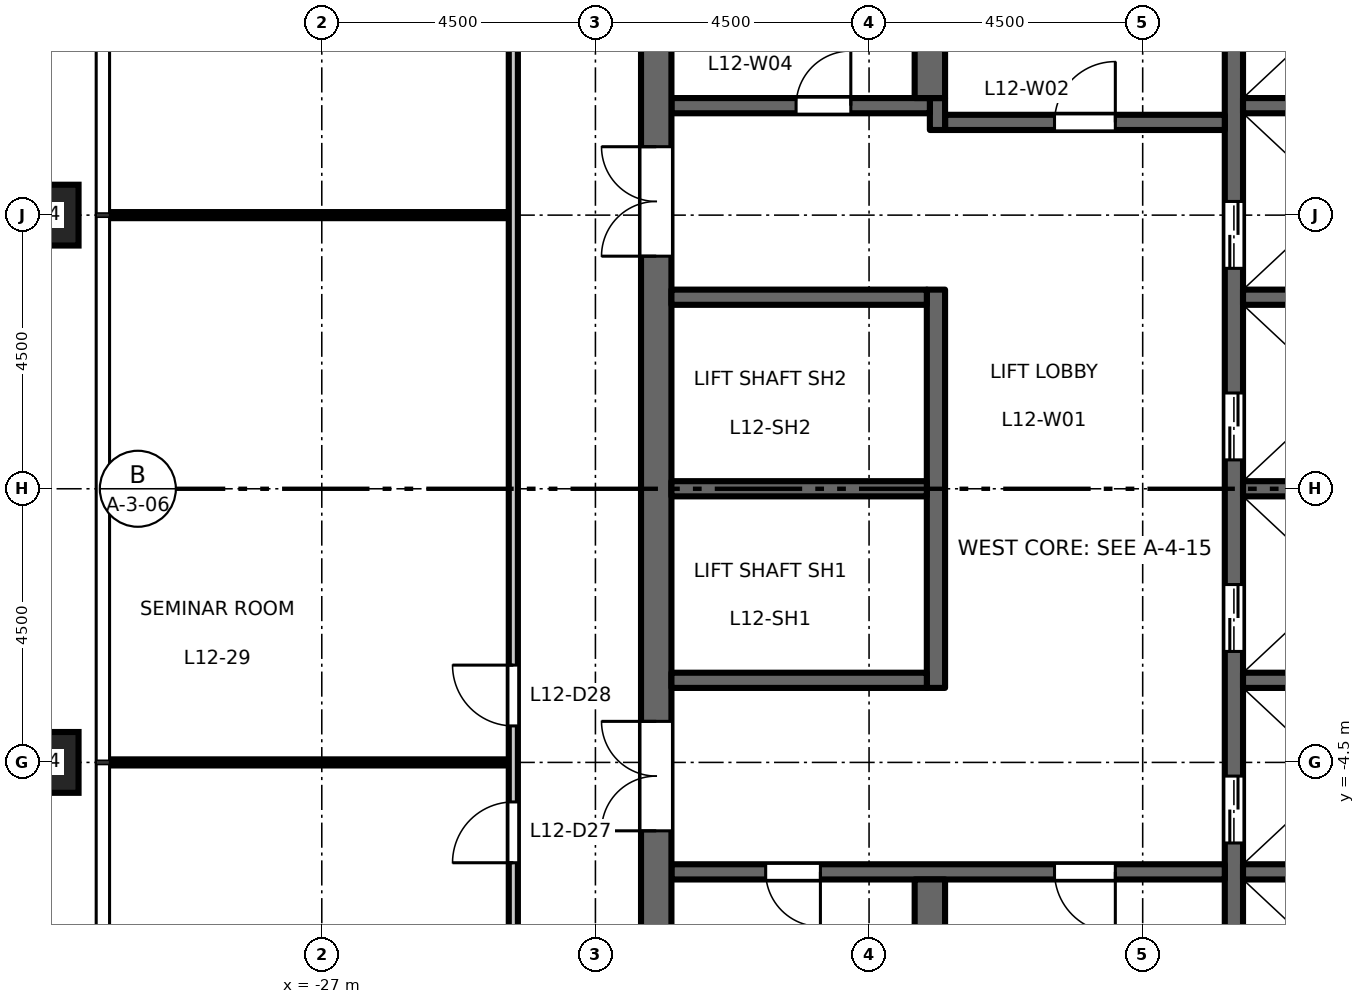
"""IFC4 building model, lengths in metres.
Left out: names, types, materials, properties, quantities, classifications, styles, units other than length and angle.
Written with IfcOpenShell. Run it as: python <this file> out.ifc"""

import sys

from ifc_helpers import new_model, si_unit, direction, frame, frame_2d, origin, origin_2d, place, context, subcontext, project, spatial, rectangle, hollow_rectangle, extrude, element, fill, save


model = new_model("IFC4")
c1 = context("Model", 3, precision=1e-05, world=origin(), true_north=direction((0.0, 1.0)))
c2 = subcontext(c1, "Body", "Model", "MODEL_VIEW")
j1 = project(units=[si_unit("LENGTHUNIT", "METRE"), si_unit("PLANEANGLEUNIT", "RADIAN")], contexts=[c1])
p1 = place(None, origin())
s1 = spatial("IfcSite", under=j1, at=p1, CompositionType="ELEMENT")
p2 = place(p1, origin())
s2 = spatial("IfcBuilding", under=s1, at=p2, CompositionType="ELEMENT")
p3 = place(p2, frame((0.0, 0.0, 58.2)))
s3 = spatial("IfcBuildingStorey", under=s2, at=p3, CompositionType="ELEMENT", Elevation=58.2)
for number, where, z_axis, x_axis in (
    (1, (-31.5, 4.5, 0.0), (0.0, 0.0, 1.0), (1.0, 0.0, 0.0)),
    (2, (-31.5, -4.5, 0.0), (0.0, 0.0, 1.0), (1.0, 0.0, 0.0)),
):
    element("IfcColumn", number, at=place(p3, frame(where, z_axis=z_axis, x_axis=x_axis)), inside=s3, PredefinedType="COLUMN", context=c2, shape_type="SweptSolid", body=[
        extrude(hollow_rectangle(XDim=1.0, YDim=1.0, WallThickness=0.06, at=origin_2d()), origin(), (0.0, 0.0, 1.0), 4.5),
    ])
p4 = place(p3, frame((-12.0, -9.45, 0.0), z_axis=(0.0, 0.0, 1.0), x_axis=(0.0, 1.0, 0.0)))
e3 = element("IfcWall", 3, at=p4, inside=s3, PredefinedType="SHEAR", context=c2, shape_type="SweptSolid", body=[
    extrude(rectangle(XDim=18.9, YDim=0.3, at=frame_2d((9.45, 0.0))), origin(), (0.0, 0.0, 1.0), 4.35),
])
p5 = place(p4, frame((3.625, 0.0, 0.0)))
e4 = element("IfcOpeningElement", 4, at=p5, cuts=e3, PredefinedType="OPENING", context=c2, shape_type="SweptSolid", body=[
    extrude(rectangle(XDim=1.1, YDim=2.1, at=frame_2d((0.55, 1.05))), frame((0.0, 0.16, 0.0), z_axis=(0.0, -1.0, 0.0), x_axis=(1.0, 0.0, 0.0)), (0.0, 0.0, 1.0), 0.32),
])
p6 = place(p4, frame((6.775, 0.0, 0.0)))
e5 = element("IfcOpeningElement", 5, at=p6, cuts=e3, PredefinedType="OPENING", context=c2, shape_type="SweptSolid", body=[
    extrude(rectangle(XDim=1.1, YDim=2.1, at=frame_2d((0.55, 1.05))), frame((0.0, 0.16, 0.0), z_axis=(0.0, -1.0, 0.0), x_axis=(1.0, 0.0, 0.0)), (0.0, 0.0, 1.0), 0.32),
])
p7 = place(p4, frame((9.925, 0.0, 0.0)))
e6 = element("IfcOpeningElement", 6, at=p7, cuts=e3, PredefinedType="OPENING", context=c2, shape_type="SweptSolid", body=[
    extrude(rectangle(XDim=1.1, YDim=2.1, at=frame_2d((0.55, 1.05))), frame((0.0, 0.16, 0.0), z_axis=(0.0, -1.0, 0.0), x_axis=(1.0, 0.0, 0.0)), (0.0, 0.0, 1.0), 0.32),
])
p8 = place(p4, frame((13.075, 0.0, 0.0)))
e7 = element("IfcOpeningElement", 7, at=p8, cuts=e3, PredefinedType="OPENING", context=c2, shape_type="SweptSolid", body=[
    extrude(rectangle(XDim=1.1, YDim=2.1, at=frame_2d((0.55, 1.05))), frame((0.0, 0.16, 0.0), z_axis=(0.0, -1.0, 0.0), x_axis=(1.0, 0.0, 0.0)), (0.0, 0.0, 1.0), 0.32),
])
p9 = place(p4, frame((16.725, 0.0, 0.0)))
e8 = element("IfcOpeningElement", 8, at=p9, cuts=e3, PredefinedType="OPENING", context=c2, shape_type="SweptSolid", body=[
    extrude(rectangle(XDim=1.2, YDim=2.1, at=frame_2d((0.6, 1.05))), frame((0.0, 0.16, 0.0), z_axis=(0.0, -1.0, 0.0), x_axis=(1.0, 0.0, 0.0)), (0.0, 0.0, 1.0), 0.32),
])
p10 = place(p4, frame((0.975, 0.0, 0.0)))
e9 = element("IfcOpeningElement", 9, at=p10, cuts=e3, PredefinedType="OPENING", context=c2, shape_type="SweptSolid", body=[
    extrude(rectangle(XDim=1.2, YDim=2.1, at=frame_2d((0.6, 1.05))), frame((0.0, 0.16, 0.0), z_axis=(0.0, -1.0, 0.0), x_axis=(1.0, 0.0, 0.0)), (0.0, 0.0, 1.0), 0.32),
])
p11 = place(p3, frame((-12.15, 6.025, 0.0), z_axis=(0.0, 0.0, 1.0), x_axis=(-1.0, 0.0, 0.0)))
e10 = element("IfcWall", 10, at=p11, inside=s3, PredefinedType="SHEAR", context=c2, shape_type="SweptSolid", body=[
    extrude(rectangle(XDim=4.6, YDim=0.25, at=frame_2d((2.3, 0.0))), origin(), (0.0, 0.0, 1.0), 4.35),
])
p12 = place(p11, frame((1.8, 0.0, 0.0)))
e11 = element("IfcOpeningElement", 11, at=p12, cuts=e10, PredefinedType="OPENING", context=c2, shape_type="SweptSolid", body=[
    extrude(rectangle(XDim=1.0, YDim=2.1, at=frame_2d((0.5, 1.05))), frame((0.0, 0.135, 0.0), z_axis=(0.0, -1.0, 0.0), x_axis=(1.0, 0.0, 0.0)), (0.0, 0.0, 1.0), 0.27),
])
p13 = place(p3, frame((-16.875, 5.9, 0.0), z_axis=(0.0, 0.0, 1.0), x_axis=(0.0, 1.0, 0.0)))
e12 = element("IfcWall", 12, at=p13, inside=s3, PredefinedType="SHEAR", context=c2, shape_type="SweptSolid", body=[
    extrude(rectangle(XDim=0.525, YDim=0.25, at=frame_2d((0.263, 0.0))), origin(), (0.0, 0.0, 1.0), 4.35),
])
p14 = place(p3, frame((-17.0, 6.3, 0.0), z_axis=(0.0, 0.0, 1.0), x_axis=(-1.0, 0.0, 0.0)))
e13 = element("IfcWall", 13, at=p14, inside=s3, PredefinedType="SHEAR", context=c2, shape_type="SweptSolid", body=[
    extrude(rectangle(XDim=4.25, YDim=0.25, at=frame_2d((2.125, 0.0))), origin(), (0.0, 0.0, 1.0), 4.35),
])
p15 = place(p14, frame((1.3, 0.0, 0.0)))
e14 = element("IfcOpeningElement", 14, at=p15, cuts=e13, PredefinedType="OPENING", context=c2, shape_type="SweptSolid", body=[
    extrude(rectangle(XDim=0.9, YDim=2.1, at=frame_2d((0.45, 1.05))), frame((0.0, 0.135, 0.0), z_axis=(0.0, -1.0, 0.0), x_axis=(1.0, 0.0, 0.0)), (0.0, 0.0, 1.0), 0.27),
])
p16 = place(p3, frame((-12.15, -6.3, 0.0), z_axis=(0.0, 0.0, 1.0), x_axis=(-1.0, 0.0, 0.0)))
e15 = element("IfcWall", 15, at=p16, inside=s3, PredefinedType="SHEAR", context=c2, shape_type="SweptSolid", body=[
    extrude(rectangle(XDim=9.1, YDim=0.25, at=frame_2d((4.55, 0.0))), origin(), (0.0, 0.0, 1.0), 4.35),
])
p17 = place(p16, frame((1.8, 0.0, 0.0)))
e16 = element("IfcOpeningElement", 16, at=p17, cuts=e15, PredefinedType="OPENING", context=c2, shape_type="SweptSolid", body=[
    extrude(rectangle(XDim=1.0, YDim=2.1, at=frame_2d((0.5, 1.05))), frame((0.0, 0.135, 0.0), z_axis=(0.0, -1.0, 0.0), x_axis=(1.0, 0.0, 0.0)), (0.0, 0.0, 1.0), 0.27),
])
p18 = place(p16, frame((6.65, 0.0, 0.0)))
e17 = element("IfcOpeningElement", 17, at=p18, cuts=e15, PredefinedType="OPENING", context=c2, shape_type="SweptSolid", body=[
    extrude(rectangle(XDim=0.9, YDim=2.1, at=frame_2d((0.45, 1.05))), frame((0.0, 0.135, 0.0), z_axis=(0.0, -1.0, 0.0), x_axis=(1.0, 0.0, 0.0)), (0.0, 0.0, 1.0), 0.27),
])
p19 = place(p3, frame((-21.5, -13.0, 0.0), z_axis=(0.0, 0.0, 1.0), x_axis=(0.0, 1.0, 0.0)))
e18 = element("IfcWall", 18, at=p19, inside=s3, PredefinedType="SHEAR", context=c2, shape_type="SweptSolid", body=[
    extrude(rectangle(XDim=26.0, YDim=0.5, at=frame_2d((13.0, 0.0))), origin(), (0.0, 0.0, 1.0), 4.35),
])
p20 = place(p19, frame((16.825, 0.0, 0.0)))
e19 = element("IfcOpeningElement", 19, at=p20, cuts=e18, PredefinedType="OPENING", context=c2, shape_type="SweptSolid", body=[
    extrude(rectangle(XDim=1.8, YDim=2.1, at=frame_2d((0.9, 1.05))), frame((0.0, 0.26, 0.0), z_axis=(0.0, -1.0, 0.0), x_axis=(1.0, 0.0, 0.0)), (0.0, 0.0, 1.0), 0.52),
])
p21 = place(p19, frame((7.375, 0.0, 0.0)))
e20 = element("IfcOpeningElement", 20, at=p21, cuts=e18, PredefinedType="OPENING", context=c2, shape_type="SweptSolid", body=[
    extrude(rectangle(XDim=1.8, YDim=2.1, at=frame_2d((0.9, 1.05))), frame((0.0, 0.26, 0.0), z_axis=(0.0, -1.0, 0.0), x_axis=(1.0, 0.0, 0.0)), (0.0, 0.0, 1.0), 0.52),
])
p22 = place(p19, frame((23.4, 0.0, 0.0)))
e21 = element("IfcOpeningElement", 21, at=p22, cuts=e18, PredefinedType="OPENING", context=c2, shape_type="SweptSolid", body=[
    extrude(rectangle(XDim=0.9, YDim=2.1, at=frame_2d((0.45, 1.05))), frame((0.0, 0.26, 0.0), z_axis=(0.0, -1.0, 0.0), x_axis=(1.0, 0.0, 0.0)), (0.0, 0.0, 1.0), 0.52),
])
p23 = place(p3, frame((-16.9, -3.275, 0.0), z_axis=(0.0, 0.0, 1.0), x_axis=(0.0, 1.0, 0.0)))
e22 = element("IfcWall", 22, at=p23, inside=s3, PredefinedType="SHEAR", context=c2, shape_type="SweptSolid", body=[
    extrude(rectangle(XDim=6.55, YDim=0.3, at=frame_2d((3.275, 0.0))), origin(), (0.0, 0.0, 1.0), 4.35),
])
for number, where, z_axis, x_axis in (
    (23, (-17.05, 0.0, 0.0), (0.0, 0.0, 1.0), (-1.0, 0.0, 0.0)),
    (24, (-17.05, 3.15, 0.0), (0.0, 0.0, 1.0), (-1.0, 0.0, 0.0)),
    (25, (-17.05, -3.15, 0.0), (0.0, 0.0, 1.0), (-1.0, 0.0, 0.0)),
):
    element("IfcWall", number, at=place(p3, frame(where, z_axis=z_axis, x_axis=x_axis)), inside=s3, PredefinedType="SHEAR", context=c2, shape_type="SweptSolid", body=[
        extrude(rectangle(XDim=4.2, YDim=0.25, at=frame_2d((2.1, 0.0))), origin(), (0.0, 0.0, 1.0), 4.35),
    ])
for number, where, z_axis, x_axis in (
    (26, (-17.0, 6.425, 0.0), (0.0, 0.0, 1.0), (0.0, 1.0, 0.0)),
    (27, (-17.0, -13.0, 0.0), (0.0, 0.0, 1.0), (0.0, 1.0, 0.0)),
):
    element("IfcWall", number, at=place(p3, frame(where, z_axis=z_axis, x_axis=x_axis)), inside=s3, PredefinedType="SHEAR", context=c2, shape_type="SweptSolid", body=[
        extrude(rectangle(XDim=6.575, YDim=0.5, at=frame_2d((3.288, 0.0))), origin(), (0.0, 0.0, 1.0), 4.35),
    ])
for number, where, z_axis, x_axis in (
    (28, (-8.75, 0.0, 0.0), (0.0, 0.0, 1.0), (-1.0, 0.0, 0.0)),
    (29, (-8.75, 3.15, 0.0), (0.0, 0.0, 1.0), (-1.0, 0.0, 0.0)),
    (30, (-8.75, 6.3, 0.0), (0.0, 0.0, 1.0), (-1.0, 0.0, 0.0)),
    (31, (-8.75, -3.15, 0.0), (0.0, 0.0, 1.0), (-1.0, 0.0, 0.0)),
    (32, (-8.75, -6.3, 0.0), (0.0, 0.0, 1.0), (-1.0, 0.0, 0.0)),
):
    element("IfcWall", number, at=place(p3, frame(where, z_axis=z_axis, x_axis=x_axis)), inside=s3, PredefinedType="SHEAR", context=c2, shape_type="SweptSolid", body=[
        extrude(rectangle(XDim=3.1, YDim=0.25, at=frame_2d((1.55, 0.0))), origin(), (0.0, 0.0, 1.0), 4.35),
    ])
for number, where, z_axis, x_axis in (
    (33, (-30.51, -4.5, 0.0), (0.0, 0.0, 1.0), (1.0, 0.0, 0.0)),
    (34, (-30.51, 4.5, 0.0), (0.0, 0.0, 1.0), (1.0, 0.0, 0.0)),
):
    element("IfcWall", number, at=place(p3, frame(where, z_axis=z_axis, x_axis=x_axis)), inside=s3, PredefinedType="PARTITIONING", context=c2, shape_type="SweptSolid", body=[
        extrude(rectangle(XDim=6.585, YDim=0.1, at=frame_2d((3.292, 0.0))), origin(), (0.0, 0.0, 1.0), 4.35),
    ])
p24 = place(p3, frame((-23.85, -15.525, 0.0), z_axis=(0.0, 0.0, 1.0), x_axis=(0.0, 1.0, 0.0)))
e35 = element("IfcWall", 35, at=p24, inside=s3, PredefinedType="PARTITIONING", context=c2, shape_type="SweptSolid", body=[
    extrude(rectangle(XDim=31.05, YDim=0.15, at=frame_2d((15.525, 0.0))), origin(), (0.0, 0.0, 1.0), 4.35),
])
p25 = place(p24, frame((29.475, 0.0, 0.0)))
e36 = element("IfcOpeningElement", 36, at=p25, cuts=e35, PredefinedType="OPENING", context=c2, shape_type="SweptSolid", body=[
    extrude(rectangle(XDim=1.0, YDim=2.1, at=frame_2d((0.5, 1.05))), frame((0.0, 0.085, 0.0), z_axis=(0.0, -1.0, 0.0), x_axis=(1.0, 0.0, 0.0)), (0.0, 0.0, 1.0), 0.17),
])
p26 = place(p24, frame((0.375, 0.0, 0.0)))
e37 = element("IfcOpeningElement", 37, at=p26, cuts=e35, PredefinedType="OPENING", context=c2, shape_type="SweptSolid", body=[
    extrude(rectangle(XDim=1.0, YDim=2.1, at=frame_2d((0.5, 1.05))), frame((0.0, 0.085, 0.0), z_axis=(0.0, -1.0, 0.0), x_axis=(1.0, 0.0, 0.0)), (0.0, 0.0, 1.0), 0.17),
])
p27 = place(p24, frame((9.375, 0.0, 0.0)))
e38 = element("IfcOpeningElement", 38, at=p27, cuts=e35, PredefinedType="OPENING", context=c2, shape_type="SweptSolid", body=[
    extrude(rectangle(XDim=1.0, YDim=2.1, at=frame_2d((0.5, 1.05))), frame((0.0, 0.085, 0.0), z_axis=(0.0, -1.0, 0.0), x_axis=(1.0, 0.0, 0.0)), (0.0, 0.0, 1.0), 0.17),
])
p28 = place(p24, frame((11.625, 0.0, 0.0)))
e39 = element("IfcOpeningElement", 39, at=p28, cuts=e35, PredefinedType="OPENING", context=c2, shape_type="SweptSolid", body=[
    extrude(rectangle(XDim=1.0, YDim=2.1, at=frame_2d((0.5, 1.05))), frame((0.0, 0.085, 0.0), z_axis=(0.0, -1.0, 0.0), x_axis=(1.0, 0.0, 0.0)), (0.0, 0.0, 1.0), 0.17),
])
p29 = place(p24, frame((27.375, 0.0, 0.0)))
e40 = element("IfcOpeningElement", 40, at=p29, cuts=e35, PredefinedType="OPENING", context=c2, shape_type="SweptSolid", body=[
    extrude(rectangle(XDim=1.0, YDim=2.1, at=frame_2d((0.5, 1.05))), frame((0.0, 0.085, 0.0), z_axis=(0.0, -1.0, 0.0), x_axis=(1.0, 0.0, 0.0)), (0.0, 0.0, 1.0), 0.17),
])
p30 = place(p12, origin())
e41 = element("IfcDoor", 41, at=p30, inside=s3, OperationType="SINGLE_SWING_LEFT", PredefinedType="DOOR", context=c2, shape_type="SweptSolid", body=[
    extrude(rectangle(XDim=1.0, YDim=2.1, at=frame_2d((0.5, 1.05))), frame((0.0, 0.025, 0.0), z_axis=(0.0, -1.0, 0.0), x_axis=(1.0, 0.0, 0.0)), (0.0, 0.0, 1.0), 0.05),
])
fill(e11, e41)
p31 = place(p17, origin())
e42 = element("IfcDoor", 42, at=p31, inside=s3, OperationType="SINGLE_SWING_RIGHT", PredefinedType="DOOR", context=c2, shape_type="SweptSolid", body=[
    extrude(rectangle(XDim=1.0, YDim=2.1, at=frame_2d((0.5, 1.05))), frame((0.0, 0.025, 0.0), z_axis=(0.0, -1.0, 0.0), x_axis=(1.0, 0.0, 0.0)), (0.0, 0.0, 1.0), 0.05),
])
fill(e16, e42)
p32 = place(p20, origin())
e43 = element("IfcDoor", 43, at=p32, inside=s3, OperationType="DOUBLE_DOOR_DOUBLE_SWING", PredefinedType="DOOR", context=c2, shape_type="SweptSolid", body=[
    extrude(rectangle(XDim=1.8, YDim=2.1, at=frame_2d((0.9, 1.05))), frame((0.0, 0.025, 0.0), z_axis=(0.0, -1.0, 0.0), x_axis=(1.0, 0.0, 0.0)), (0.0, 0.0, 1.0), 0.05),
])
fill(e19, e43)
p33 = place(p21, origin())
e44 = element("IfcDoor", 44, at=p33, inside=s3, OperationType="DOUBLE_DOOR_DOUBLE_SWING", PredefinedType="DOOR", context=c2, shape_type="SweptSolid", body=[
    extrude(rectangle(XDim=1.8, YDim=2.1, at=frame_2d((0.9, 1.05))), frame((0.0, 0.025, 0.0), z_axis=(0.0, -1.0, 0.0), x_axis=(1.0, 0.0, 0.0)), (0.0, 0.0, 1.0), 0.05),
])
fill(e20, e44)
p34 = place(p5, origin())
e45 = element("IfcDoor", 45, at=p34, inside=s3, OperationType="DOUBLE_DOOR_SLIDING", PredefinedType="DOOR", context=c2, shape_type="SweptSolid", body=[
    extrude(rectangle(XDim=1.1, YDim=2.1, at=frame_2d((0.55, 1.05))), frame((0.0, 0.025, 0.0), z_axis=(0.0, -1.0, 0.0), x_axis=(1.0, 0.0, 0.0)), (0.0, 0.0, 1.0), 0.05),
])
fill(e4, e45)
p35 = place(p6, origin())
e46 = element("IfcDoor", 46, at=p35, inside=s3, OperationType="DOUBLE_DOOR_SLIDING", PredefinedType="DOOR", context=c2, shape_type="SweptSolid", body=[
    extrude(rectangle(XDim=1.1, YDim=2.1, at=frame_2d((0.55, 1.05))), frame((0.0, 0.025, 0.0), z_axis=(0.0, -1.0, 0.0), x_axis=(1.0, 0.0, 0.0)), (0.0, 0.0, 1.0), 0.05),
])
fill(e5, e46)
p36 = place(p7, origin())
e47 = element("IfcDoor", 47, at=p36, inside=s3, OperationType="DOUBLE_DOOR_SLIDING", PredefinedType="DOOR", context=c2, shape_type="SweptSolid", body=[
    extrude(rectangle(XDim=1.1, YDim=2.1, at=frame_2d((0.55, 1.05))), frame((0.0, 0.025, 0.0), z_axis=(0.0, -1.0, 0.0), x_axis=(1.0, 0.0, 0.0)), (0.0, 0.0, 1.0), 0.05),
])
fill(e6, e47)
p37 = place(p8, origin())
e48 = element("IfcDoor", 48, at=p37, inside=s3, OperationType="DOUBLE_DOOR_SLIDING", PredefinedType="DOOR", context=c2, shape_type="SweptSolid", body=[
    extrude(rectangle(XDim=1.1, YDim=2.1, at=frame_2d((0.55, 1.05))), frame((0.0, 0.025, 0.0), z_axis=(0.0, -1.0, 0.0), x_axis=(1.0, 0.0, 0.0)), (0.0, 0.0, 1.0), 0.05),
])
fill(e7, e48)
p38 = place(p15, origin())
e49 = element("IfcDoor", 49, at=p38, inside=s3, OperationType="SINGLE_SWING_LEFT", PredefinedType="DOOR", context=c2, shape_type="SweptSolid", body=[
    extrude(rectangle(XDim=0.9, YDim=2.1, at=frame_2d((0.45, 1.05))), frame((0.0, 0.025, 0.0), z_axis=(0.0, -1.0, 0.0), x_axis=(1.0, 0.0, 0.0)), (0.0, 0.0, 1.0), 0.05),
])
fill(e14, e49)
p39 = place(p18, origin())
e50 = element("IfcDoor", 50, at=p39, inside=s3, OperationType="SINGLE_SWING_RIGHT", PredefinedType="DOOR", context=c2, shape_type="SweptSolid", body=[
    extrude(rectangle(XDim=0.9, YDim=2.1, at=frame_2d((0.45, 1.05))), frame((0.0, 0.025, 0.0), z_axis=(0.0, -1.0, 0.0), x_axis=(1.0, 0.0, 0.0)), (0.0, 0.0, 1.0), 0.05),
])
fill(e17, e50)
p40 = place(p27, origin())
e51 = element("IfcDoor", 51, at=p40, inside=s3, OperationType="SINGLE_SWING_LEFT", PredefinedType="DOOR", context=c2, shape_type="SweptSolid", body=[
    extrude(rectangle(XDim=1.0, YDim=2.1, at=frame_2d((0.5, 1.05))), frame((0.0, 0.025, 0.0), z_axis=(0.0, -1.0, 0.0), x_axis=(1.0, 0.0, 0.0)), (0.0, 0.0, 1.0), 0.05),
])
fill(e38, e51)
p41 = place(p28, origin())
e52 = element("IfcDoor", 52, at=p41, inside=s3, OperationType="SINGLE_SWING_RIGHT", PredefinedType="DOOR", context=c2, shape_type="SweptSolid", body=[
    extrude(rectangle(XDim=1.0, YDim=2.1, at=frame_2d((0.5, 1.05))), frame((0.0, 0.025, 0.0), z_axis=(0.0, -1.0, 0.0), x_axis=(1.0, 0.0, 0.0)), (0.0, 0.0, 1.0), 0.05),
])
fill(e39, e52)
save(model, sys.argv[1])
